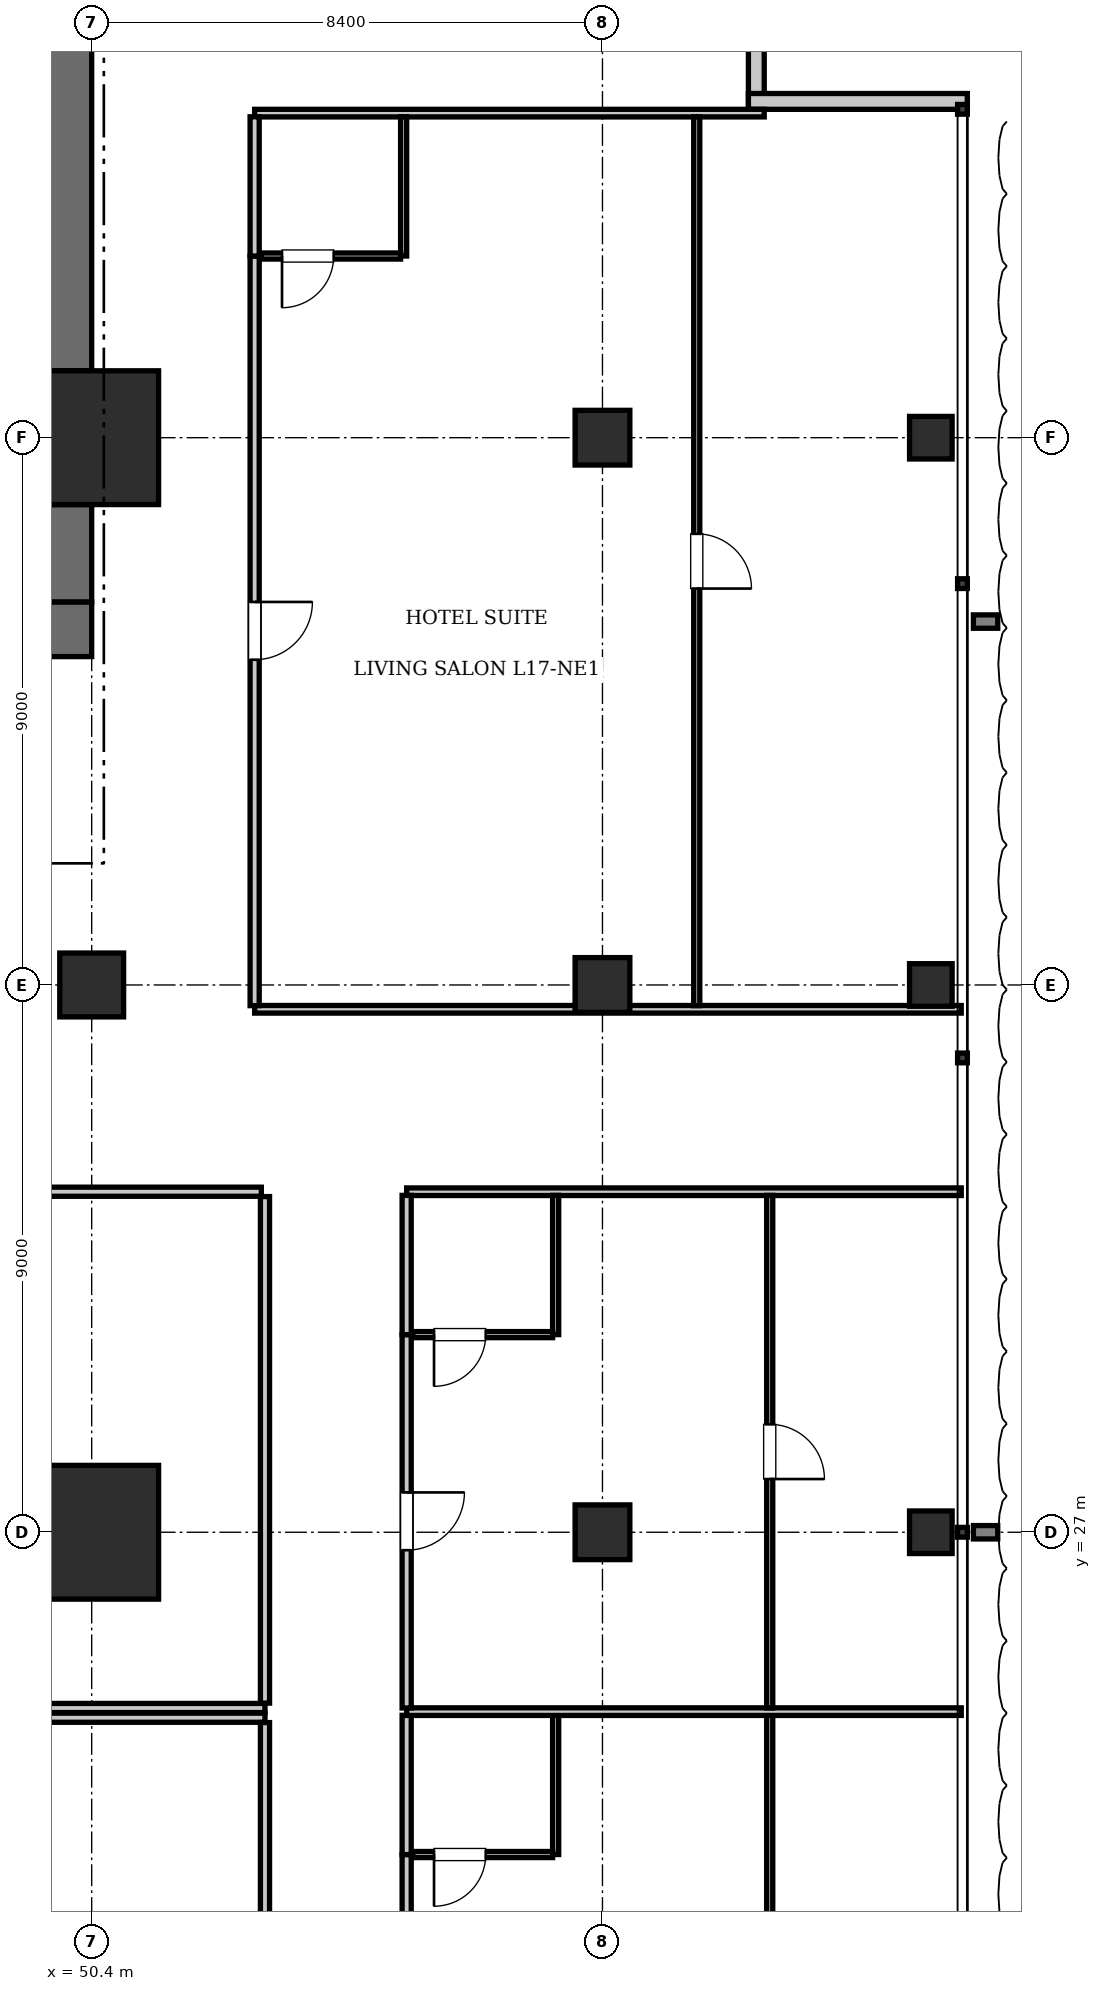
"""IFC4 building model, lengths in metres.
Left out: names, types, materials, properties, quantities, classifications, styles, units other than length and angle.
Written with IfcOpenShell. Run it as: python <this file> out.ifc"""

import sys

from ifc_helpers import new_model, si_unit, direction, frame, frame_2d, origin, origin_2d, place, context, subcontext, project, spatial, rectangle, i_section, extrude, element, fill, save


model = new_model("IFC4")
c1 = context("Model", 3, precision=1e-05, world=origin(), true_north=direction((0.0, 1.0)))
c2 = subcontext(c1, "Body", "Model", "MODEL_VIEW")
j1 = project(units=[si_unit("LENGTHUNIT", "METRE"), si_unit("PLANEANGLEUNIT", "RADIAN")], contexts=[c1])
p1 = place(None, origin())
s1 = spatial("IfcSite", under=j1, at=p1, CompositionType="ELEMENT")
p2 = place(p1, origin())
s2 = spatial("IfcBuilding", under=s1, at=p2, CompositionType="ELEMENT")
p3 = place(p2, frame((0.0, 0.0, 73.15)))
s3 = spatial("IfcBuildingStorey", under=s2, at=p3, CompositionType="ELEMENT", Elevation=73.15)
for number, where, z_axis, x_axis in (
    (1, (50.4, 27.0, 0.0), (0.0, 0.0, 1.0), (1.0, 0.0, 0.0)),
    (2, (50.4, 45.0, 0.0), (0.0, 0.0, 1.0), (1.0, 0.0, 0.0)),
):
    element("IfcColumn", number, at=place(p3, frame(where, z_axis=z_axis, x_axis=x_axis)), inside=s3, PredefinedType="COLUMN", context=c2, shape_type="SweptSolid", body=[
        extrude(rectangle(XDim=2.2, YDim=2.2, at=origin_2d()), origin(), (0.0, 0.0, 1.0), 3.85),
    ])
p4 = place(p3, frame((43.6, 41.85, 0.0), z_axis=(0.0, 0.0, 1.0), x_axis=(1.0, 0.0, 0.0)))
e3 = element("IfcWall", 3, at=p4, inside=s3, PredefinedType="SHEAR", context=c2, shape_type="SweptSolid", body=[
    extrude(rectangle(XDim=6.8, YDim=0.9, at=frame_2d((3.4, 0.0))), origin(), (0.0, 0.0, 1.0), 3.85),
])
p5 = place(p4, frame((3.9, 0.0, 0.0)))
e4 = element("IfcOpeningElement", 4, at=p5, cuts=e3, PredefinedType="OPENING", context=c2, shape_type="SweptSolid", body=[
    extrude(rectangle(XDim=1.15, YDim=2.15, at=frame_2d((0.575, 1.075))), frame((0.0, 0.46, 0.0), z_axis=(0.0, -1.0, 0.0), x_axis=(1.0, 0.0, 0.0)), (0.0, 0.0, 1.0), 0.92),
])
p6 = place(p4, frame((0.55, 0.0, 0.0)))
e5 = element("IfcOpeningElement", 5, at=p6, cuts=e3, PredefinedType="OPENING", context=c2, shape_type="SweptSolid", body=[
    extrude(rectangle(XDim=1.1, YDim=2.2, at=frame_2d((0.55, 1.1))), frame((0.0, 0.46, 0.0), z_axis=(0.0, -1.0, 0.0), x_axis=(1.0, 0.0, 0.0)), (0.0, 0.0, 1.0), 0.92),
])
p7 = place(p3, frame((49.95, 42.3, 0.0), z_axis=(0.0, 0.0, 1.0), x_axis=(0.0, 1.0, 0.0)))
e6 = element("IfcWall", 6, at=p7, inside=s3, PredefinedType="SHEAR", context=c2, shape_type="SweptSolid", body=[
    extrude(rectangle(XDim=1.6, YDim=0.9, at=frame_2d((0.8, 0.0))), origin(), (0.0, 0.0, 1.0), 3.85),
])
p8 = place(p3, frame((49.95, 46.1, 0.0), z_axis=(0.0, 0.0, 1.0), x_axis=(0.0, 1.0, 0.0)))
e7 = element("IfcWall", 7, at=p8, inside=s3, PredefinedType="SHEAR", context=c2, shape_type="SweptSolid", body=[
    extrude(rectangle(XDim=7.0, YDim=0.9, at=frame_2d((3.5, 0.0))), origin(), (0.0, 0.0, 1.0), 3.85),
])
p9 = place(p3, frame((50.4, 36.0, 0.0), z_axis=(0.0, 0.0, 1.0), x_axis=(1.0, 0.0, 0.0)))
e8 = element("IfcColumn", 8, at=p9, inside=s3, PredefinedType="COLUMN", context=c2, shape_type="SweptSolid", body=[
    extrude(rectangle(XDim=1.05, YDim=1.05, at=origin_2d()), origin(), (0.0, 0.0, 1.0), 3.85),
])
for number, where, z_axis, x_axis in (
    (9, (58.8, 27.0, 0.0), (0.0, 0.0, 1.0), (1.0, 0.0, 0.0)),
    (10, (58.8, 36.0, 0.0), (0.0, 0.0, 1.0), (1.0, 0.0, 0.0)),
    (11, (58.8, 45.0, 0.0), (0.0, 0.0, 1.0), (1.0, 0.0, 0.0)),
):
    element("IfcColumn", number, at=place(p3, frame(where, z_axis=z_axis, x_axis=x_axis)), inside=s3, PredefinedType="COLUMN", context=c2, shape_type="SweptSolid", body=[
        extrude(rectangle(XDim=0.9, YDim=0.9, at=origin_2d()), origin(), (0.0, 0.0, 1.0), 3.85),
    ])
for number, where, z_axis, x_axis in (
    (12, (64.2, 27.0, 0.0), (0.0, 0.0, 1.0), (1.0, 0.0, 0.0)),
    (13, (64.2, 36.0, 0.0), (0.0, 0.0, 1.0), (1.0, 0.0, 0.0)),
    (14, (64.2, 45.0, 0.0), (0.0, 0.0, 1.0), (1.0, 0.0, 0.0)),
):
    element("IfcColumn", number, at=place(p3, frame(where, z_axis=z_axis, x_axis=x_axis)), inside=s3, PredefinedType="COLUMN", context=c2, shape_type="SweptSolid", body=[
        extrude(i_section(OverallWidth=0.7, OverallDepth=0.7, WebThickness=0.028, FlangeThickness=0.044, at=origin_2d()), origin(), (0.0, 0.0, 1.0), 3.85),
    ])
for number, where, z_axis, x_axis in (
    (15, (61.33, 54.0, 0.0), (0.0, 0.0, 1.0), (0.0, -1.0, 0.0)),
    (16, (61.2, 50.53, 0.0), (0.0, 0.0, 1.0), (1.0, 0.0, 0.0)),
):
    element("IfcWall", number, at=place(p3, frame(where, z_axis=z_axis, x_axis=x_axis)), inside=s3, PredefinedType="SOLIDWALL", context=c2, shape_type="SweptSolid", body=[
        extrude(rectangle(XDim=3.6, YDim=0.26, at=frame_2d((1.8, 0.0))), origin(), (0.0, 0.0, 1.0), 3.61),
    ])
p10 = place(p3, frame((22.35, 24.11, 0.0), z_axis=(0.0, 0.0, 1.0), x_axis=(1.0, 0.0, 0.0)))
e17 = element("IfcWall", 17, at=p10, inside=s3, PredefinedType="PARTITIONING", context=c2, shape_type="SweptSolid", body=[
    extrude(rectangle(XDim=30.9, YDim=0.15, at=frame_2d((15.45, 0.0))), origin(), (0.0, 0.0, 1.0), 3.61),
])
p11 = place(p3, frame((53.25, 24.19, 0.0), z_axis=(0.0, 0.0, 1.0), x_axis=(0.0, 1.0, 0.0)))
e18 = element("IfcWall", 18, at=p11, inside=s3, PredefinedType="PARTITIONING", context=c2, shape_type="SweptSolid", body=[
    extrude(rectangle(XDim=8.33, YDim=0.15, at=frame_2d((4.165, 0.0))), origin(), (0.0, 0.0, 1.0), 3.61),
])
p12 = place(p3, frame((42.774, 32.6, 0.0), z_axis=(0.0, 0.0, 1.0), x_axis=(1.0, 0.0, 0.0)))
e19 = element("IfcWall", 19, at=p12, inside=s3, PredefinedType="PARTITIONING", context=c2, shape_type="SweptSolid", body=[
    extrude(rectangle(XDim=10.416, YDim=0.15, at=frame_2d((5.208, 0.0))), origin(), (0.0, 0.0, 1.0), 3.61),
])
p13 = place(p12, frame((4.758, 0.0, 0.0)))
e20 = element("IfcOpeningElement", 20, at=p13, cuts=e19, PredefinedType="OPENING", context=c2, shape_type="SweptSolid", body=[
    extrude(rectangle(XDim=0.9, YDim=2.1, at=frame_2d((0.45, 1.05))), frame((0.0, 0.085, 0.0), z_axis=(0.0, -1.0, 0.0), x_axis=(1.0, 0.0, 0.0)), (0.0, 0.0, 1.0), 0.17),
])
p14 = place(p3, frame((22.35, 23.95, 0.0), z_axis=(0.0, 0.0, 1.0), x_axis=(1.0, 0.0, 0.0)))
e21 = element("IfcWall", 21, at=p14, inside=s3, PredefinedType="PARTITIONING", context=c2, shape_type="SweptSolid", body=[
    extrude(rectangle(XDim=30.9, YDim=0.15, at=frame_2d((15.45, 0.0))), origin(), (0.0, 0.0, 1.0), 3.61),
])
p15 = place(p3, frame((53.25, 15.53, 0.0), z_axis=(0.0, 0.0, 1.0), x_axis=(0.0, 1.0, 0.0)))
e22 = element("IfcWall", 22, at=p15, inside=s3, PredefinedType="PARTITIONING", context=c2, shape_type="SweptSolid", body=[
    extrude(rectangle(XDim=8.34, YDim=0.15, at=frame_2d((4.17, 0.0))), origin(), (0.0, 0.0, 1.0), 3.61),
])
p16 = place(p3, frame((55.58, 32.6, 0.0), z_axis=(0.0, 0.0, 1.0), x_axis=(1.0, 0.0, 0.0)))
e23 = element("IfcWall", 23, at=p16, inside=s3, PredefinedType="PARTITIONING", context=c2, shape_type="SweptSolid", body=[
    extrude(rectangle(XDim=9.12, YDim=0.125, at=frame_2d((4.56, 0.0))), origin(), (0.0, 0.0, 1.0), 3.61),
])
p17 = place(p3, frame((55.58, 15.56, 0.0), z_axis=(0.0, 0.0, 1.0), x_axis=(0.0, 1.0, 0.0)))
e24 = element("IfcWall", 24, at=p17, inside=s3, PredefinedType="PARTITIONING", context=c2, shape_type="SweptSolid", body=[
    extrude(rectangle(XDim=6.14, YDim=0.15, at=frame_2d((3.07, 0.0))), origin(), (0.0, 0.0, 1.0), 3.61),
])
p18 = place(p17, frame((2.595, 0.0, 0.0)))
e25 = element("IfcOpeningElement", 25, at=p18, cuts=e24, PredefinedType="OPENING", context=c2, shape_type="SweptSolid", body=[
    extrude(rectangle(XDim=0.95, YDim=2.15, at=frame_2d((0.475, 1.075))), frame((0.0, 0.085, 0.0), z_axis=(0.0, -1.0, 0.0), x_axis=(1.0, 0.0, 0.0)), (0.0, 0.0, 1.0), 0.17),
])
p19 = place(p3, frame((55.58, 21.7, 0.0), z_axis=(0.0, 0.0, 1.0), x_axis=(0.0, 1.0, 0.0)))
e26 = element("IfcWall", 26, at=p19, inside=s3, PredefinedType="PARTITIONING", context=c2, shape_type="SweptSolid", body=[
    extrude(rectangle(XDim=2.29, YDim=0.15, at=frame_2d((1.145, 0.0))), origin(), (0.0, 0.0, 1.0), 3.61),
])
p20 = place(p3, frame((58.03, 21.7, 0.0), z_axis=(0.0, 0.0, 1.0), x_axis=(0.0, 1.0, 0.0)))
e27 = element("IfcWall", 27, at=p20, inside=s3, PredefinedType="PARTITIONING", context=c2, shape_type="SweptSolid", body=[
    extrude(rectangle(XDim=2.29, YDim=0.1, at=frame_2d((1.145, 0.0))), origin(), (0.0, 0.0, 1.0), 3.61),
])
p21 = place(p3, frame((55.68, 21.7, 0.0), z_axis=(0.0, 0.0, 1.0), x_axis=(1.0, 0.0, 0.0)))
e28 = element("IfcWall", 28, at=p21, inside=s3, PredefinedType="PARTITIONING", context=c2, shape_type="SweptSolid", body=[
    extrude(rectangle(XDim=2.3, YDim=0.1, at=frame_2d((1.15, 0.0))), origin(), (0.0, 0.0, 1.0), 3.61),
])
p22 = place(p21, frame((0.35, 0.0, 0.0)))
e29 = element("IfcOpeningElement", 29, at=p22, cuts=e28, PredefinedType="OPENING", context=c2, shape_type="SweptSolid", body=[
    extrude(rectangle(XDim=0.85, YDim=2.1, at=frame_2d((0.425, 1.05))), frame((0.0, 0.06, 0.0), z_axis=(0.0, -1.0, 0.0), x_axis=(1.0, 0.0, 0.0)), (0.0, 0.0, 1.0), 0.12),
])
p23 = place(p3, frame((61.55, 15.56, 0.0), z_axis=(0.0, 0.0, 1.0), x_axis=(0.0, 1.0, 0.0)))
e30 = element("IfcWall", 30, at=p23, inside=s3, PredefinedType="PARTITIONING", context=c2, shape_type="SweptSolid", body=[
    extrude(rectangle(XDim=8.43, YDim=0.1, at=frame_2d((4.215, 0.0))), origin(), (0.0, 0.0, 1.0), 3.207),
])
p24 = place(p23, frame((3.765, 0.0, 0.0)))
e31 = element("IfcOpeningElement", 31, at=p24, cuts=e30, PredefinedType="OPENING", context=c2, shape_type="SweptSolid", body=[
    extrude(rectangle(XDim=0.9, YDim=2.1, at=frame_2d((0.45, 1.05))), frame((0.0, 0.06, 0.0), z_axis=(0.0, -1.0, 0.0), x_axis=(1.0, 0.0, 0.0)), (0.0, 0.0, 1.0), 0.12),
])
p25 = place(p3, frame((55.58, 24.05, 0.0), z_axis=(0.0, 0.0, 1.0), x_axis=(1.0, 0.0, 0.0)))
e32 = element("IfcWall", 32, at=p25, inside=s3, PredefinedType="PARTITIONING", context=c2, shape_type="SweptSolid", body=[
    extrude(rectangle(XDim=9.12, YDim=0.125, at=frame_2d((4.56, 0.0))), origin(), (0.0, 0.0, 1.0), 3.61),
])
p26 = place(p3, frame((55.58, 24.11, 0.0), z_axis=(0.0, 0.0, 1.0), x_axis=(0.0, 1.0, 0.0)))
e33 = element("IfcWall", 33, at=p26, inside=s3, PredefinedType="PARTITIONING", context=c2, shape_type="SweptSolid", body=[
    extrude(rectangle(XDim=6.14, YDim=0.15, at=frame_2d((3.07, 0.0))), origin(), (0.0, 0.0, 1.0), 3.61),
])
p27 = place(p26, frame((2.595, 0.0, 0.0)))
e34 = element("IfcOpeningElement", 34, at=p27, cuts=e33, PredefinedType="OPENING", context=c2, shape_type="SweptSolid", body=[
    extrude(rectangle(XDim=0.95, YDim=2.15, at=frame_2d((0.475, 1.075))), frame((0.0, 0.085, 0.0), z_axis=(0.0, -1.0, 0.0), x_axis=(1.0, 0.0, 0.0)), (0.0, 0.0, 1.0), 0.17),
])
p28 = place(p3, frame((55.58, 30.25, 0.0), z_axis=(0.0, 0.0, 1.0), x_axis=(0.0, 1.0, 0.0)))
e35 = element("IfcWall", 35, at=p28, inside=s3, PredefinedType="PARTITIONING", context=c2, shape_type="SweptSolid", body=[
    extrude(rectangle(XDim=2.29, YDim=0.15, at=frame_2d((1.145, 0.0))), origin(), (0.0, 0.0, 1.0), 3.61),
])
p29 = place(p3, frame((58.03, 30.25, 0.0), z_axis=(0.0, 0.0, 1.0), x_axis=(0.0, 1.0, 0.0)))
e36 = element("IfcWall", 36, at=p29, inside=s3, PredefinedType="PARTITIONING", context=c2, shape_type="SweptSolid", body=[
    extrude(rectangle(XDim=2.29, YDim=0.1, at=frame_2d((1.145, 0.0))), origin(), (0.0, 0.0, 1.0), 3.61),
])
p30 = place(p3, frame((55.68, 30.25, 0.0), z_axis=(0.0, 0.0, 1.0), x_axis=(1.0, 0.0, 0.0)))
e37 = element("IfcWall", 37, at=p30, inside=s3, PredefinedType="PARTITIONING", context=c2, shape_type="SweptSolid", body=[
    extrude(rectangle(XDim=2.3, YDim=0.1, at=frame_2d((1.15, 0.0))), origin(), (0.0, 0.0, 1.0), 3.61),
])
p31 = place(p30, frame((0.35, 0.0, 0.0)))
e38 = element("IfcOpeningElement", 38, at=p31, cuts=e37, PredefinedType="OPENING", context=c2, shape_type="SweptSolid", body=[
    extrude(rectangle(XDim=0.85, YDim=2.1, at=frame_2d((0.425, 1.05))), frame((0.0, 0.06, 0.0), z_axis=(0.0, -1.0, 0.0), x_axis=(1.0, 0.0, 0.0)), (0.0, 0.0, 1.0), 0.12),
])
p32 = place(p3, frame((61.55, 24.11, 0.0), z_axis=(0.0, 0.0, 1.0), x_axis=(0.0, 1.0, 0.0)))
e39 = element("IfcWall", 39, at=p32, inside=s3, PredefinedType="PARTITIONING", context=c2, shape_type="SweptSolid", body=[
    extrude(rectangle(XDim=8.43, YDim=0.1, at=frame_2d((4.215, 0.0))), origin(), (0.0, 0.0, 1.0), 3.207),
])
p33 = place(p32, frame((3.765, 0.0, 0.0)))
e40 = element("IfcOpeningElement", 40, at=p33, cuts=e39, PredefinedType="OPENING", context=c2, shape_type="SweptSolid", body=[
    extrude(rectangle(XDim=0.9, YDim=2.1, at=frame_2d((0.45, 1.05))), frame((0.0, 0.06, 0.0), z_axis=(0.0, -1.0, 0.0), x_axis=(1.0, 0.0, 0.0)), (0.0, 0.0, 1.0), 0.12),
])
p34 = place(p3, frame((53.08, 35.6, 0.0), z_axis=(0.0, 0.0, 1.0), x_axis=(1.0, 0.0, 0.0)))
e41 = element("IfcWall", 41, at=p34, inside=s3, PredefinedType="PARTITIONING", context=c2, shape_type="SweptSolid", body=[
    extrude(rectangle(XDim=11.62, YDim=0.125, at=frame_2d((5.81, 0.0))), origin(), (0.0, 0.0, 1.0), 3.61),
])
p35 = place(p3, frame((53.08, 50.337, 0.0), z_axis=(0.0, 0.0, 1.0), x_axis=(1.0, 0.0, 0.0)))
e42 = element("IfcWall", 42, at=p35, inside=s3, PredefinedType="PARTITIONING", context=c2, shape_type="SweptSolid", body=[
    extrude(rectangle(XDim=8.38, YDim=0.125, at=frame_2d((4.19, 0.0))), origin(), (0.0, 0.0, 1.0), 3.61),
])
p36 = place(p3, frame((53.08, 35.66, 0.0), z_axis=(0.0, 0.0, 1.0), x_axis=(0.0, 1.0, 0.0)))
e43 = element("IfcWall", 43, at=p36, inside=s3, PredefinedType="PARTITIONING", context=c2, shape_type="SweptSolid", body=[
    extrude(rectangle(XDim=12.328, YDim=0.15, at=frame_2d((6.164, 0.0))), origin(), (0.0, 0.0, 1.0), 3.61),
])
p37 = place(p36, frame((5.689, 0.0, 0.0)))
e44 = element("IfcOpeningElement", 44, at=p37, cuts=e43, PredefinedType="OPENING", context=c2, shape_type="SweptSolid", body=[
    extrude(rectangle(XDim=0.95, YDim=2.15, at=frame_2d((0.475, 1.075))), frame((0.0, 0.085, 0.0), z_axis=(0.0, -1.0, 0.0), x_axis=(1.0, 0.0, 0.0)), (0.0, 0.0, 1.0), 0.17),
])
p38 = place(p3, frame((53.08, 47.988, 0.0), z_axis=(0.0, 0.0, 1.0), x_axis=(0.0, 1.0, 0.0)))
e45 = element("IfcWall", 45, at=p38, inside=s3, PredefinedType="PARTITIONING", context=c2, shape_type="SweptSolid", body=[
    extrude(rectangle(XDim=2.29, YDim=0.15, at=frame_2d((1.145, 0.0))), origin(), (0.0, 0.0, 1.0), 3.61),
])
p39 = place(p3, frame((55.53, 47.988, 0.0), z_axis=(0.0, 0.0, 1.0), x_axis=(0.0, 1.0, 0.0)))
e46 = element("IfcWall", 46, at=p39, inside=s3, PredefinedType="PARTITIONING", context=c2, shape_type="SweptSolid", body=[
    extrude(rectangle(XDim=2.29, YDim=0.1, at=frame_2d((1.145, 0.0))), origin(), (0.0, 0.0, 1.0), 3.61),
])
p40 = place(p3, frame((53.18, 47.988, 0.0), z_axis=(0.0, 0.0, 1.0), x_axis=(1.0, 0.0, 0.0)))
e47 = element("IfcWall", 47, at=p40, inside=s3, PredefinedType="PARTITIONING", context=c2, shape_type="SweptSolid", body=[
    extrude(rectangle(XDim=2.3, YDim=0.1, at=frame_2d((1.15, 0.0))), origin(), (0.0, 0.0, 1.0), 3.61),
])
p41 = place(p40, frame((0.35, 0.0, 0.0)))
e48 = element("IfcOpeningElement", 48, at=p41, cuts=e47, PredefinedType="OPENING", context=c2, shape_type="SweptSolid", body=[
    extrude(rectangle(XDim=0.85, YDim=2.1, at=frame_2d((0.425, 1.05))), frame((0.0, 0.06, 0.0), z_axis=(0.0, -1.0, 0.0), x_axis=(1.0, 0.0, 0.0)), (0.0, 0.0, 1.0), 0.12),
])
p42 = place(p3, frame((60.35, 35.66, 0.0), z_axis=(0.0, 0.0, 1.0), x_axis=(0.0, 1.0, 0.0)))
e49 = element("IfcWall", 49, at=p42, inside=s3, PredefinedType="PARTITIONING", context=c2, shape_type="SweptSolid", body=[
    extrude(rectangle(XDim=14.618, YDim=0.1, at=frame_2d((7.309, 0.0))), origin(), (0.0, 0.0, 1.0), 3.61),
])
p43 = place(p42, frame((6.859, 0.0, 0.0)))
e50 = element("IfcOpeningElement", 50, at=p43, cuts=e49, PredefinedType="OPENING", context=c2, shape_type="SweptSolid", body=[
    extrude(rectangle(XDim=0.9, YDim=2.1, at=frame_2d((0.45, 1.05))), frame((0.0, 0.06, 0.0), z_axis=(0.0, -1.0, 0.0), x_axis=(1.0, 0.0, 0.0)), (0.0, 0.0, 1.0), 0.12),
])
p44 = place(p22, frame((0.85, 0.0, 0.0), z_axis=(0.0, 0.0, 1.0), x_axis=(-1.0, 0.0, 0.0)))
e51 = element("IfcDoor", 51, at=p44, inside=s3, OperationType="SINGLE_SWING_RIGHT", PredefinedType="DOOR", context=c2, shape_type="SweptSolid", body=[
    extrude(rectangle(XDim=0.85, YDim=2.1, at=frame_2d((0.425, 1.05))), frame((0.0, 0.025, 0.0), z_axis=(0.0, -1.0, 0.0), x_axis=(1.0, 0.0, 0.0)), (0.0, 0.0, 1.0), 0.05),
])
fill(e29, e51)
p45 = place(p31, frame((0.85, 0.0, 0.0), z_axis=(0.0, 0.0, 1.0), x_axis=(-1.0, 0.0, 0.0)))
e52 = element("IfcDoor", 52, at=p45, inside=s3, OperationType="SINGLE_SWING_RIGHT", PredefinedType="DOOR", context=c2, shape_type="SweptSolid", body=[
    extrude(rectangle(XDim=0.85, YDim=2.1, at=frame_2d((0.425, 1.05))), frame((0.0, 0.025, 0.0), z_axis=(0.0, -1.0, 0.0), x_axis=(1.0, 0.0, 0.0)), (0.0, 0.0, 1.0), 0.05),
])
fill(e38, e52)
p46 = place(p27, frame((0.95, 0.0, 0.0), z_axis=(0.0, 0.0, 1.0), x_axis=(-1.0, 0.0, 0.0)))
e53 = element("IfcDoor", 53, at=p46, inside=s3, OperationType="SINGLE_SWING_LEFT", PredefinedType="DOOR", context=c2, shape_type="SweptSolid", body=[
    extrude(rectangle(XDim=0.95, YDim=2.15, at=frame_2d((0.475, 1.075))), frame((0.0, 0.025, 0.0), z_axis=(0.0, -1.0, 0.0), x_axis=(1.0, 0.0, 0.0)), (0.0, 0.0, 1.0), 0.05),
])
fill(e34, e53)
p47 = place(p33, frame((0.9, 0.0, 0.0), z_axis=(0.0, 0.0, 1.0), x_axis=(-1.0, 0.0, 0.0)))
e54 = element("IfcDoor", 54, at=p47, inside=s3, OperationType="SINGLE_SWING_RIGHT", PredefinedType="DOOR", context=c2, shape_type="SweptSolid", body=[
    extrude(rectangle(XDim=0.9, YDim=2.1, at=frame_2d((0.45, 1.05))), frame((0.0, 0.025, 0.0), z_axis=(0.0, -1.0, 0.0), x_axis=(1.0, 0.0, 0.0)), (0.0, 0.0, 1.0), 0.05),
])
fill(e40, e54)
p48 = place(p41, frame((0.85, 0.0, 0.0), z_axis=(0.0, 0.0, 1.0), x_axis=(-1.0, 0.0, 0.0)))
e55 = element("IfcDoor", 55, at=p48, inside=s3, OperationType="SINGLE_SWING_RIGHT", PredefinedType="DOOR", context=c2, shape_type="SweptSolid", body=[
    extrude(rectangle(XDim=0.85, YDim=2.1, at=frame_2d((0.425, 1.05))), frame((0.0, 0.025, 0.0), z_axis=(0.0, -1.0, 0.0), x_axis=(1.0, 0.0, 0.0)), (0.0, 0.0, 1.0), 0.05),
])
fill(e48, e55)
p49 = place(p37, frame((0.95, 0.0, 0.0), z_axis=(0.0, 0.0, 1.0), x_axis=(-1.0, 0.0, 0.0)))
e56 = element("IfcDoor", 56, at=p49, inside=s3, OperationType="SINGLE_SWING_LEFT", PredefinedType="DOOR", context=c2, shape_type="SweptSolid", body=[
    extrude(rectangle(XDim=0.95, YDim=2.15, at=frame_2d((0.475, 1.075))), frame((0.0, 0.025, 0.0), z_axis=(0.0, -1.0, 0.0), x_axis=(1.0, 0.0, 0.0)), (0.0, 0.0, 1.0), 0.05),
])
fill(e44, e56)
p50 = place(p43, frame((0.9, 0.0, 0.0), z_axis=(0.0, 0.0, 1.0), x_axis=(-1.0, 0.0, 0.0)))
e57 = element("IfcDoor", 57, at=p50, inside=s3, OperationType="SINGLE_SWING_RIGHT", PredefinedType="DOOR", context=c2, shape_type="SweptSolid", body=[
    extrude(rectangle(XDim=0.9, YDim=2.1, at=frame_2d((0.45, 1.05))), frame((0.0, 0.025, 0.0), z_axis=(0.0, -1.0, 0.0), x_axis=(1.0, 0.0, 0.0)), (0.0, 0.0, 1.0), 0.05),
])
fill(e50, e57)
save(model, sys.argv[1])
